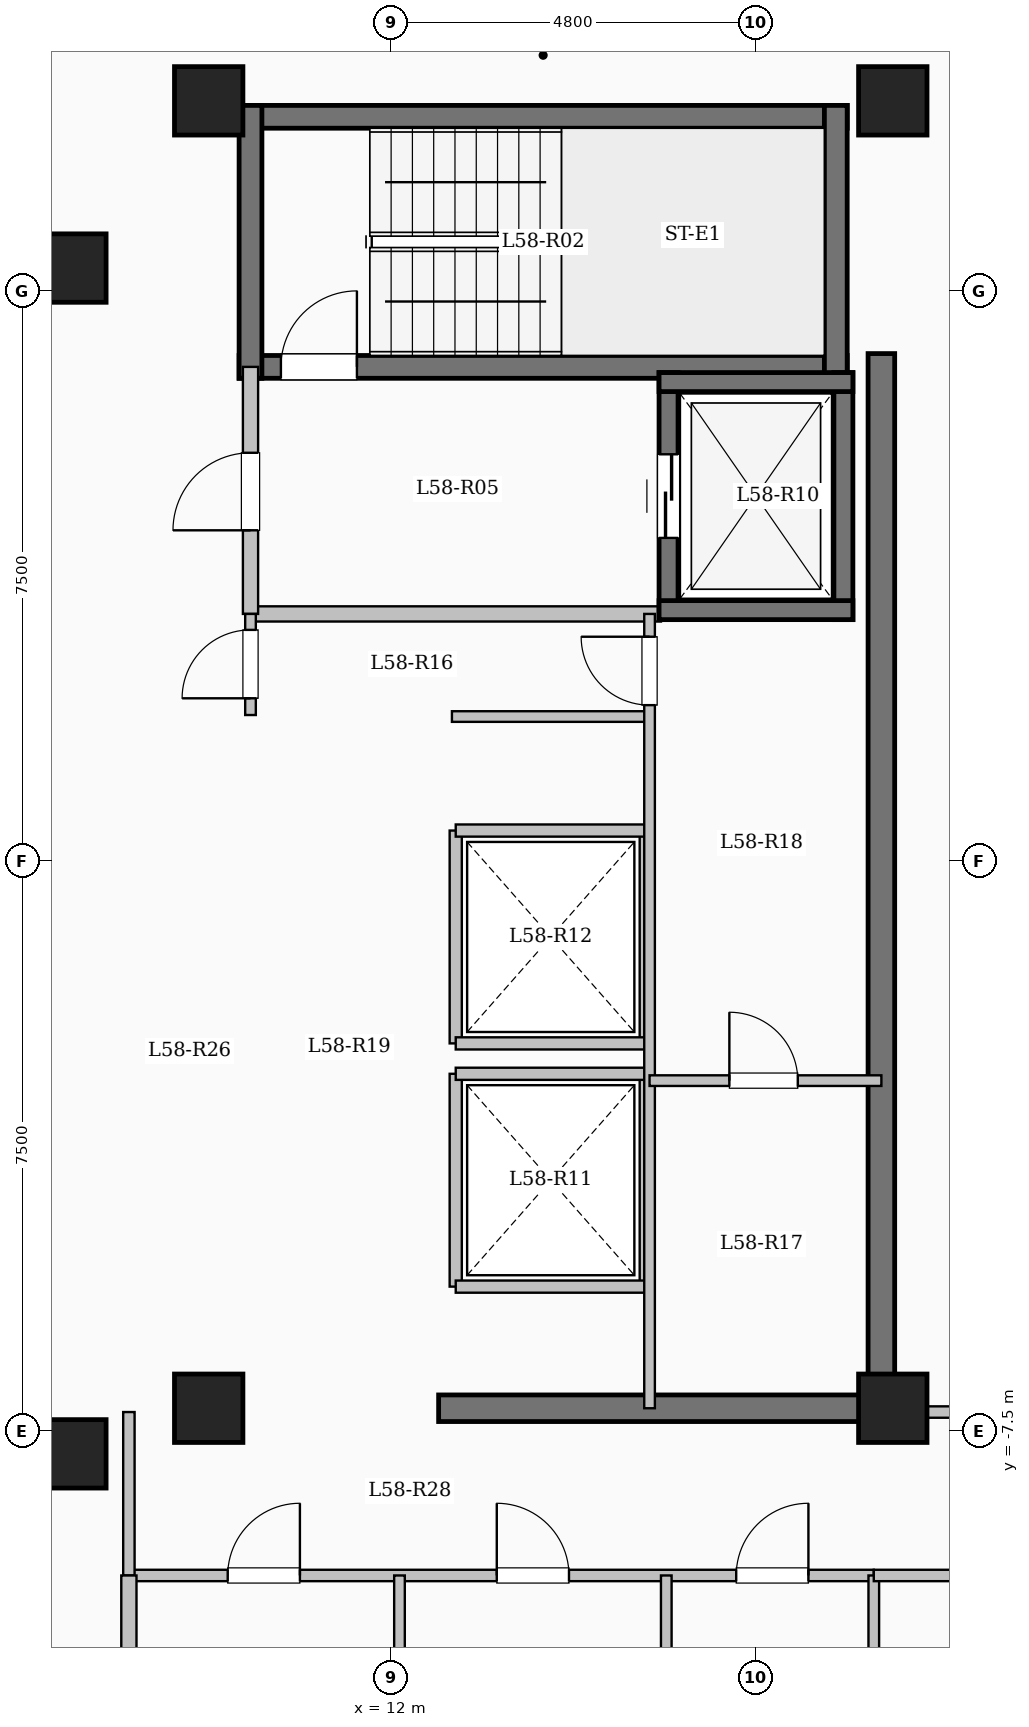
"""IFC4 building model, lengths in metres.
Left out: names, types, materials, properties, quantities, classifications, styles, units other than length and angle.
Written with IfcOpenShell. Run it as: python <this file> out.ifc"""

import sys

from ifc_helpers import new_model, si_unit, direction, frame, frame_2d, origin, origin_2d, place, context, subcontext, project, spatial, rectangle, extrude, element, fill, save


model = new_model("IFC4")
c1 = context("Model", 3, precision=1e-05, world=origin(), true_north=direction((0.0, 1.0)))
c2 = subcontext(c1, "Body", "Model", "MODEL_VIEW")
j1 = project(units=[si_unit("LENGTHUNIT", "METRE"), si_unit("PLANEANGLEUNIT", "RADIAN")], contexts=[c1])
p1 = place(None, origin())
s1 = spatial("IfcSite", under=j1, at=p1, CompositionType="ELEMENT")
p2 = place(p1, origin())
s2 = spatial("IfcBuilding", under=s1, at=p2, CompositionType="ELEMENT")
p3 = place(p2, frame((0.0, 0.0, 213.7)))
s3 = spatial("IfcBuildingStorey", under=s2, at=p3, CompositionType="ELEMENT", Elevation=213.7)
for number, where, z_axis, x_axis in (
    (1, (7.8, -7.8, 0.0), (0.0, 0.0, 1.0), (1.0, 0.0, 0.0)),
    (2, (7.8, 7.8, 0.0), (0.0, 0.0, 1.0), (1.0, 0.0, 0.0)),
    (3, (9.6, -7.2, 0.0), (0.0, 0.0, 1.0), (1.0, 0.0, 0.0)),
    (4, (9.6, 10.0, 0.0), (0.0, 0.0, 1.0), (1.0, 0.0, 0.0)),
    (5, (18.6, -7.2, 0.0), (0.0, 0.0, 1.0), (1.0, 0.0, 0.0)),
    (6, (18.6, 10.0, 0.0), (0.0, 0.0, 1.0), (1.0, 0.0, 0.0)),
):
    element("IfcColumn", number, at=place(p3, frame(where, z_axis=z_axis, x_axis=x_axis)), inside=s3, PredefinedType="COLUMN", context=c2, shape_type="SweptSolid", body=[
        extrude(rectangle(XDim=0.9, YDim=0.9, at=origin_2d()), origin(), (0.0, 0.0, 1.0), 3.35),
    ])
p4 = place(p3, frame((10.0, 9.79, 0.0), z_axis=(0.0, 0.0, 1.0), x_axis=(1.0, 0.0, 0.0)))
e7 = element("IfcWall", 7, at=p4, inside=s3, PredefinedType="SHEAR", context=c2, shape_type="SweptSolid", body=[
    extrude(rectangle(XDim=8.0, YDim=0.3, at=frame_2d((4.0, 0.0))), origin(), (0.0, 0.0, 1.0), 3.35),
])
p5 = place(p3, frame((10.0, 6.5, 0.0), z_axis=(0.0, 0.0, 1.0), x_axis=(1.0, 0.0, 0.0)))
e8 = element("IfcWall", 8, at=p5, inside=s3, PredefinedType="SHEAR", context=c2, shape_type="SweptSolid", body=[
    extrude(rectangle(XDim=8.0, YDim=0.3, at=frame_2d((4.0, 0.0))), origin(), (0.0, 0.0, 1.0), 3.35),
])
p6 = place(p5, frame((0.55, 0.0, 0.0)))
e9 = element("IfcOpeningElement", 9, at=p6, cuts=e8, PredefinedType="OPENING", context=c2, shape_type="SweptSolid", body=[
    extrude(rectangle(XDim=1.0, YDim=2.15, at=frame_2d((0.5, 1.075))), frame((0.0, 0.16, 0.0), z_axis=(0.0, -1.0, 0.0), x_axis=(1.0, 0.0, 0.0)), (0.0, 0.0, 1.0), 0.32),
])
for number, where, z_axis, x_axis in (
    (10, (10.15, 6.35, 0.0), (0.0, 0.0, 1.0), (0.0, 1.0, 0.0)),
    (11, (17.85, 6.35, 0.0), (0.0, 0.0, 1.0), (0.0, 1.0, 0.0)),
):
    element("IfcWall", number, at=place(p3, frame(where, z_axis=z_axis, x_axis=x_axis)), inside=s3, PredefinedType="SHEAR", context=c2, shape_type="SweptSolid", body=[
        extrude(rectangle(XDim=3.59, YDim=0.3, at=frame_2d((1.795, 0.0))), origin(), (0.0, 0.0, 1.0), 3.35),
    ])
p7 = place(p3, frame((10.15, 3.25, 0.0), z_axis=(0.0, 0.0, 1.0), x_axis=(1.0, 0.0, 0.0)))
e12 = element("IfcWall", 12, at=p7, inside=s3, PredefinedType="SOLIDWALL", context=c2, shape_type="SweptSolid", body=[
    extrude(rectangle(XDim=5.4, YDim=0.2, at=frame_2d((2.7, 0.0))), origin(), (0.0, 0.0, 1.0), 3.1),
])
p8 = place(p3, frame((10.15, 3.25, 0.0), z_axis=(0.0, 0.0, 1.0), x_axis=(0.0, 1.0, 0.0)))
e13 = element("IfcWall", 13, at=p8, inside=s3, PredefinedType="SOLIDWALL", context=c2, shape_type="SweptSolid", body=[
    extrude(rectangle(XDim=3.25, YDim=0.2, at=frame_2d((1.625, 0.0))), origin(), (0.0, 0.0, 1.0), 3.1),
])
p9 = place(p8, frame((1.1, 0.0, 0.0)))
e14 = element("IfcOpeningElement", 14, at=p9, cuts=e13, PredefinedType="OPENING", context=c2, shape_type="SweptSolid", body=[
    extrude(rectangle(XDim=1.02, YDim=2.15, at=frame_2d((0.51, 1.075))), frame((0.0, 0.11, 0.0), z_axis=(0.0, -1.0, 0.0), x_axis=(1.0, 0.0, 0.0)), (0.0, 0.0, 1.0), 0.22),
])
p10 = place(p3, frame((15.65, 3.175, 0.0), z_axis=(0.0, 0.0, 1.0), x_axis=(0.0, 1.0, 0.0)))
e15 = element("IfcWall", 15, at=p10, inside=s3, PredefinedType="SHEAR", context=c2, shape_type="SweptSolid", body=[
    extrude(rectangle(XDim=3.25, YDim=0.25, at=frame_2d((1.625, 0.0))), origin(), (0.0, 0.0, 1.0), 3.35),
])
p11 = place(p10, frame((1.075, 0.0, 0.0)))
e16 = element("IfcOpeningElement", 16, at=p11, cuts=e15, PredefinedType="OPENING", context=c2, shape_type="SweptSolid", body=[
    extrude(rectangle(XDim=1.1, YDim=2.15, at=frame_2d((0.55, 1.075))), frame((0.0, 0.135, 0.0), z_axis=(0.0, -1.0, 0.0), x_axis=(1.0, 0.0, 0.0)), (0.0, 0.0, 1.0), 0.27),
])
p12 = place(p3, frame((17.95, 3.175, 0.0), z_axis=(0.0, 0.0, 1.0), x_axis=(0.0, 1.0, 0.0)))
e17 = element("IfcWall", 17, at=p12, inside=s3, PredefinedType="SHEAR", context=c2, shape_type="SweptSolid", body=[
    extrude(rectangle(XDim=3.25, YDim=0.25, at=frame_2d((1.625, 0.0))), origin(), (0.0, 0.0, 1.0), 3.35),
])
for number, where, z_axis, x_axis in (
    (18, (15.525, 3.3, 0.0), (0.0, 0.0, 1.0), (1.0, 0.0, 0.0)),
    (19, (15.525, 6.3, 0.0), (0.0, 0.0, 1.0), (1.0, 0.0, 0.0)),
):
    element("IfcWall", number, at=place(p3, frame(where, z_axis=z_axis, x_axis=x_axis)), inside=s3, PredefinedType="SHEAR", context=c2, shape_type="SweptSolid", body=[
        extrude(rectangle(XDim=2.55, YDim=0.25, at=frame_2d((1.275, 0.0))), origin(), (0.0, 0.0, 1.0), 3.35),
    ])
for number, where, z_axis, x_axis in (
    (20, (12.85, -5.6, 0.0), (0.0, 0.0, 1.0), (0.0, 1.0, 0.0)),
    (21, (15.35, -5.6, 0.0), (0.0, 0.0, 1.0), (0.0, 1.0, 0.0)),
):
    element("IfcWall", number, at=place(p3, frame(where, z_axis=z_axis, x_axis=x_axis)), inside=s3, PredefinedType="SOLIDWALL", context=c2, shape_type="SweptSolid", body=[
        extrude(rectangle(XDim=2.8, YDim=0.16, at=frame_2d((1.4, 0.0))), origin(), (0.0, 0.0, 1.0), 3.1),
    ])
for number, where, z_axis, x_axis in (
    (22, (12.85, -5.6, 0.0), (0.0, 0.0, 1.0), (1.0, 0.0, 0.0)),
    (23, (12.85, -2.8, 0.0), (0.0, 0.0, 1.0), (1.0, 0.0, 0.0)),
):
    element("IfcWall", number, at=place(p3, frame(where, z_axis=z_axis, x_axis=x_axis)), inside=s3, PredefinedType="SOLIDWALL", context=c2, shape_type="SweptSolid", body=[
        extrude(rectangle(XDim=2.5, YDim=0.16, at=frame_2d((1.25, 0.0))), origin(), (0.0, 0.0, 1.0), 3.1),
    ])
for number, where, z_axis, x_axis in (
    (24, (12.85, -2.4, 0.0), (0.0, 0.0, 1.0), (0.0, 1.0, 0.0)),
    (25, (15.35, -2.4, 0.0), (0.0, 0.0, 1.0), (0.0, 1.0, 0.0)),
):
    element("IfcWall", number, at=place(p3, frame(where, z_axis=z_axis, x_axis=x_axis)), inside=s3, PredefinedType="SOLIDWALL", context=c2, shape_type="SweptSolid", body=[
        extrude(rectangle(XDim=2.8, YDim=0.16, at=frame_2d((1.4, 0.0))), origin(), (0.0, 0.0, 1.0), 3.1),
    ])
for number, where, z_axis, x_axis in (
    (26, (12.85, -2.4, 0.0), (0.0, 0.0, 1.0), (1.0, 0.0, 0.0)),
    (27, (12.85, 0.4, 0.0), (0.0, 0.0, 1.0), (1.0, 0.0, 0.0)),
):
    element("IfcWall", number, at=place(p3, frame(where, z_axis=z_axis, x_axis=x_axis)), inside=s3, PredefinedType="SOLIDWALL", context=c2, shape_type="SweptSolid", body=[
        extrude(rectangle(XDim=2.5, YDim=0.16, at=frame_2d((1.25, 0.0))), origin(), (0.0, 0.0, 1.0), 3.1),
    ])
p13 = place(p3, frame((18.45, -7.375, 0.0), z_axis=(0.0, 0.0, 1.0), x_axis=(0.0, 1.0, 0.0)))
e28 = element("IfcWall", 28, at=p13, inside=s3, PredefinedType="SHEAR", context=c2, shape_type="SweptSolid", body=[
    extrude(rectangle(XDim=14.05, YDim=0.35, at=frame_2d((7.025, 0.0))), origin(), (0.0, 0.0, 1.0), 3.35),
])
p14 = place(p3, frame((12.625, -7.2, 0.0), z_axis=(0.0, 0.0, 1.0), x_axis=(1.0, 0.0, 0.0)))
e29 = element("IfcWall", 29, at=p14, inside=s3, PredefinedType="SHEAR", context=c2, shape_type="SweptSolid", body=[
    extrude(rectangle(XDim=6.0, YDim=0.35, at=frame_2d((3.0, 0.0))), origin(), (0.0, 0.0, 1.0), 3.35),
])
p15 = place(p3, frame((12.8, 1.9, 0.0), z_axis=(0.0, 0.0, 1.0), x_axis=(1.0, 0.0, 0.0)))
e30 = element("IfcWall", 30, at=p15, inside=s3, PredefinedType="PARTITIONING", context=c2, shape_type="SweptSolid", body=[
    extrude(rectangle(XDim=2.6, YDim=0.14, at=frame_2d((1.3, 0.0))), origin(), (0.0, 0.0, 1.0), 3.1),
])
p16 = place(p3, frame((10.15, 1.92, 0.0), z_axis=(0.0, 0.0, 1.0), x_axis=(0.0, 1.0, 0.0)))
e31 = element("IfcWall", 31, at=p16, inside=s3, PredefinedType="PARTITIONING", context=c2, shape_type="SweptSolid", body=[
    extrude(rectangle(XDim=1.33, YDim=0.14, at=frame_2d((0.665, 0.0))), origin(), (0.0, 0.0, 1.0), 3.1),
])
p17 = place(p16, frame((0.22, 0.0, 0.0)))
e32 = element("IfcOpeningElement", 32, at=p17, cuts=e31, PredefinedType="OPENING", context=c2, shape_type="SweptSolid", body=[
    extrude(rectangle(XDim=0.9, YDim=2.08, at=frame_2d((0.45, 1.04))), frame((0.0, 0.08, 0.0), z_axis=(0.0, -1.0, 0.0), x_axis=(1.0, 0.0, 0.0)), (0.0, 0.0, 1.0), 0.16),
])
p18 = place(p3, frame((15.4, -7.2, 0.0), z_axis=(0.0, 0.0, 1.0), x_axis=(0.0, 1.0, 0.0)))
e33 = element("IfcWall", 33, at=p18, inside=s3, PredefinedType="PARTITIONING", context=c2, shape_type="SweptSolid", body=[
    extrude(rectangle(XDim=10.45, YDim=0.14, at=frame_2d((5.225, 0.0))), origin(), (0.0, 0.0, 1.0), 3.1),
])
p19 = place(p18, frame((9.25, 0.0, 0.0)))
e34 = element("IfcOpeningElement", 34, at=p19, cuts=e33, PredefinedType="OPENING", context=c2, shape_type="SweptSolid", body=[
    extrude(rectangle(XDim=0.9, YDim=2.08, at=frame_2d((0.45, 1.04))), frame((0.0, 0.08, 0.0), z_axis=(0.0, -1.0, 0.0), x_axis=(1.0, 0.0, 0.0)), (0.0, 0.0, 1.0), 0.16),
])
p20 = place(p3, frame((15.4, -2.89, 0.0), z_axis=(0.0, 0.0, 1.0), x_axis=(1.0, 0.0, 0.0)))
e35 = element("IfcWall", 35, at=p20, inside=s3, PredefinedType="PARTITIONING", context=c2, shape_type="SweptSolid", body=[
    extrude(rectangle(XDim=3.05, YDim=0.14, at=frame_2d((1.525, 0.0))), origin(), (0.0, 0.0, 1.0), 3.1),
])
p21 = place(p20, frame((1.05, 0.0, 0.0)))
e36 = element("IfcOpeningElement", 36, at=p21, cuts=e35, PredefinedType="OPENING", context=c2, shape_type="SweptSolid", body=[
    extrude(rectangle(XDim=0.9, YDim=2.08, at=frame_2d((0.45, 1.04))), frame((0.0, 0.08, 0.0), z_axis=(0.0, -1.0, 0.0), x_axis=(1.0, 0.0, 0.0)), (0.0, 0.0, 1.0), 0.16),
])
p22 = place(p3, frame((8.55, -9.4, 0.0), z_axis=(0.0, 0.0, 1.0), x_axis=(1.0, 0.0, 0.0)))
e37 = element("IfcWall", 37, at=p22, inside=s3, PredefinedType="PARTITIONING", context=c2, shape_type="SweptSolid", body=[
    extrude(rectangle(XDim=9.8, YDim=0.15, at=frame_2d((4.9, 0.0))), origin(), (0.0, 0.0, 1.0), 3.1),
])
p23 = place(p22, frame((1.3, 0.0, 0.0)))
e38 = element("IfcOpeningElement", 38, at=p23, cuts=e37, PredefinedType="OPENING", context=c2, shape_type="SweptSolid", body=[
    extrude(rectangle(XDim=0.95, YDim=2.15, at=frame_2d((0.475, 1.075))), frame((0.0, 0.085, 0.0), z_axis=(0.0, -1.0, 0.0), x_axis=(1.0, 0.0, 0.0)), (0.0, 0.0, 1.0), 0.17),
])
p24 = place(p22, frame((4.84, 0.0, 0.0)))
e39 = element("IfcOpeningElement", 39, at=p24, cuts=e37, PredefinedType="OPENING", context=c2, shape_type="SweptSolid", body=[
    extrude(rectangle(XDim=0.95, YDim=2.15, at=frame_2d((0.475, 1.075))), frame((0.0, 0.085, 0.0), z_axis=(0.0, -1.0, 0.0), x_axis=(1.0, 0.0, 0.0)), (0.0, 0.0, 1.0), 0.17),
])
p25 = place(p22, frame((7.99, 0.0, 0.0)))
e40 = element("IfcOpeningElement", 40, at=p25, cuts=e37, PredefinedType="OPENING", context=c2, shape_type="SweptSolid", body=[
    extrude(rectangle(XDim=0.95, YDim=2.15, at=frame_2d((0.475, 1.075))), frame((0.0, 0.085, 0.0), z_axis=(0.0, -1.0, 0.0), x_axis=(1.0, 0.0, 0.0)), (0.0, 0.0, 1.0), 0.17),
])
p26 = place(p3, frame((8.55, -9.4, 0.0), z_axis=(0.0, 0.0, 1.0), x_axis=(0.0, 1.0, 0.0)))
e41 = element("IfcWall", 41, at=p26, inside=s3, PredefinedType="PARTITIONING", context=c2, shape_type="SweptSolid", body=[
    extrude(rectangle(XDim=2.15, YDim=0.15, at=frame_2d((1.075, 0.0))), origin(), (0.0, 0.0, 1.0), 3.1),
])
for number, where, z_axis, x_axis in (
    (42, (12.11, -20.85, 0.0), (0.0, 0.0, 1.0), (0.0, 1.0, 0.0)),
    (43, (15.62, -20.85, 0.0), (0.0, 0.0, 1.0), (0.0, 1.0, 0.0)),
):
    element("IfcWall", number, at=place(p3, frame(where, z_axis=z_axis, x_axis=x_axis)), inside=s3, PredefinedType="PARTITIONING", context=c2, shape_type="SweptSolid", body=[
        extrude(rectangle(XDim=11.45, YDim=0.14, at=frame_2d((5.725, 0.0))), origin(), (0.0, 0.0, 1.0), 3.1),
    ])
p27 = place(p3, frame((8.55, -21.504, 0.0), z_axis=(0.0, 0.0, 1.0), x_axis=(0.0, 1.0, 0.0)))
e44 = element("IfcWall", 44, at=p27, inside=s3, PredefinedType="SOLIDWALL", context=c2, shape_type="SweptSolid", body=[
    extrude(rectangle(XDim=12.104, YDim=0.2, at=frame_2d((6.052, 0.0))), origin(), (0.0, 0.0, 1.0), 3.1),
])
p28 = place(p3, frame((18.45, -7.25, 0.0), z_axis=(0.0, 0.0, 1.0), x_axis=(1.0, 0.0, 0.0)))
e45 = element("IfcWall", 45, at=p28, inside=s3, PredefinedType="PARTITIONING", context=c2, shape_type="SweptSolid", body=[
    extrude(rectangle(XDim=5.13, YDim=0.15, at=frame_2d((2.565, 0.0))), origin(), (0.0, 0.0, 1.0), 3.1),
])
p29 = place(p28, frame((1.95, 0.0, 0.0)))
e46 = element("IfcOpeningElement", 46, at=p29, cuts=e45, PredefinedType="OPENING", context=c2, shape_type="SweptSolid", body=[
    extrude(rectangle(XDim=1.08, YDim=2.15, at=frame_2d((0.54, 1.075))), frame((0.0, 0.085, 0.0), z_axis=(0.0, -1.0, 0.0), x_axis=(1.0, 0.0, 0.0)), (0.0, 0.0, 1.0), 0.17),
])
p30 = place(p3, frame((18.35, -17.25, 0.0), z_axis=(0.0, 0.0, 1.0), x_axis=(0.0, 1.0, 0.0)))
e47 = element("IfcWall", 47, at=p30, inside=s3, PredefinedType="PARTITIONING", context=c2, shape_type="SweptSolid", body=[
    extrude(rectangle(XDim=7.85, YDim=0.14, at=frame_2d((3.925, 0.0))), origin(), (0.0, 0.0, 1.0), 3.1),
])
p31 = place(p3, frame((18.35, -9.4, 0.0), z_axis=(0.0, 0.0, 1.0), x_axis=(1.0, 0.0, 0.0)))
e48 = element("IfcWall", 48, at=p31, inside=s3, PredefinedType="PARTITIONING", context=c2, shape_type="SweptSolid", body=[
    extrude(rectangle(XDim=5.23, YDim=0.15, at=frame_2d((2.615, 0.0))), origin(), (0.0, 0.0, 1.0), 3.1),
])
p32 = place(p31, frame((2.14, 0.0, 0.0)))
e49 = element("IfcOpeningElement", 49, at=p32, cuts=e48, PredefinedType="OPENING", context=c2, shape_type="SweptSolid", body=[
    extrude(rectangle(XDim=0.95, YDim=2.15, at=frame_2d((0.475, 1.075))), frame((0.0, 0.085, 0.0), z_axis=(0.0, -1.0, 0.0), x_axis=(1.0, 0.0, 0.0)), (0.0, 0.0, 1.0), 0.17),
])
p33 = place(p6, origin())
e50 = element("IfcDoor", 50, at=p33, inside=s3, OperationType="SINGLE_SWING_RIGHT", PredefinedType="DOOR", context=c2, shape_type="SweptSolid", body=[
    extrude(rectangle(XDim=1.0, YDim=2.15, at=frame_2d((0.5, 1.075))), frame((0.0, 0.025, 0.0), z_axis=(0.0, -1.0, 0.0), x_axis=(1.0, 0.0, 0.0)), (0.0, 0.0, 1.0), 0.05),
])
fill(e9, e50)
p34 = place(p9, origin())
e51 = element("IfcDoor", 51, at=p34, inside=s3, OperationType="SINGLE_SWING_LEFT", PredefinedType="DOOR", context=c2, shape_type="SweptSolid", body=[
    extrude(rectangle(XDim=1.02, YDim=2.15, at=frame_2d((0.51, 1.075))), frame((0.0, 0.025, 0.0), z_axis=(0.0, -1.0, 0.0), x_axis=(1.0, 0.0, 0.0)), (0.0, 0.0, 1.0), 0.05),
])
fill(e14, e51)
p35 = place(p11, origin())
e52 = element("IfcDoor", 52, at=p35, inside=s3, OperationType="SLIDING_TO_LEFT", PredefinedType="DOOR", context=c2, shape_type="SweptSolid", body=[
    extrude(rectangle(XDim=1.1, YDim=2.15, at=frame_2d((0.55, 1.075))), frame((0.0, 0.025, 0.0), z_axis=(0.0, -1.0, 0.0), x_axis=(1.0, 0.0, 0.0)), (0.0, 0.0, 1.0), 0.05),
])
fill(e16, e52)
p36 = place(p17, origin())
e53 = element("IfcDoor", 53, at=p36, inside=s3, OperationType="SINGLE_SWING_LEFT", PredefinedType="DOOR", context=c2, shape_type="SweptSolid", body=[
    extrude(rectangle(XDim=0.9, YDim=2.08, at=frame_2d((0.45, 1.04))), frame((0.0, 0.025, 0.0), z_axis=(0.0, -1.0, 0.0), x_axis=(1.0, 0.0, 0.0)), (0.0, 0.0, 1.0), 0.05),
])
fill(e32, e53)
p37 = place(p19, origin())
e54 = element("IfcDoor", 54, at=p37, inside=s3, OperationType="SINGLE_SWING_RIGHT", PredefinedType="DOOR", context=c2, shape_type="SweptSolid", body=[
    extrude(rectangle(XDim=0.9, YDim=2.08, at=frame_2d((0.45, 1.04))), frame((0.0, 0.025, 0.0), z_axis=(0.0, -1.0, 0.0), x_axis=(1.0, 0.0, 0.0)), (0.0, 0.0, 1.0), 0.05),
])
fill(e34, e54)
p38 = place(p21, origin())
e55 = element("IfcDoor", 55, at=p38, inside=s3, OperationType="SINGLE_SWING_LEFT", PredefinedType="DOOR", context=c2, shape_type="SweptSolid", body=[
    extrude(rectangle(XDim=0.9, YDim=2.08, at=frame_2d((0.45, 1.04))), frame((0.0, 0.025, 0.0), z_axis=(0.0, -1.0, 0.0), x_axis=(1.0, 0.0, 0.0)), (0.0, 0.0, 1.0), 0.05),
])
fill(e36, e55)
p39 = place(p23, origin())
e56 = element("IfcDoor", 56, at=p39, inside=s3, OperationType="SINGLE_SWING_RIGHT", PredefinedType="DOOR", context=c2, shape_type="SweptSolid", body=[
    extrude(rectangle(XDim=0.95, YDim=2.15, at=frame_2d((0.475, 1.075))), frame((0.0, 0.025, 0.0), z_axis=(0.0, -1.0, 0.0), x_axis=(1.0, 0.0, 0.0)), (0.0, 0.0, 1.0), 0.05),
])
fill(e38, e56)
p40 = place(p24, origin())
e57 = element("IfcDoor", 57, at=p40, inside=s3, OperationType="SINGLE_SWING_LEFT", PredefinedType="DOOR", context=c2, shape_type="SweptSolid", body=[
    extrude(rectangle(XDim=0.95, YDim=2.15, at=frame_2d((0.475, 1.075))), frame((0.0, 0.025, 0.0), z_axis=(0.0, -1.0, 0.0), x_axis=(1.0, 0.0, 0.0)), (0.0, 0.0, 1.0), 0.05),
])
fill(e39, e57)
p41 = place(p25, origin())
e58 = element("IfcDoor", 58, at=p41, inside=s3, OperationType="SINGLE_SWING_RIGHT", PredefinedType="DOOR", context=c2, shape_type="SweptSolid", body=[
    extrude(rectangle(XDim=0.95, YDim=2.15, at=frame_2d((0.475, 1.075))), frame((0.0, 0.025, 0.0), z_axis=(0.0, -1.0, 0.0), x_axis=(1.0, 0.0, 0.0)), (0.0, 0.0, 1.0), 0.05),
])
fill(e40, e58)
save(model, sys.argv[1])
